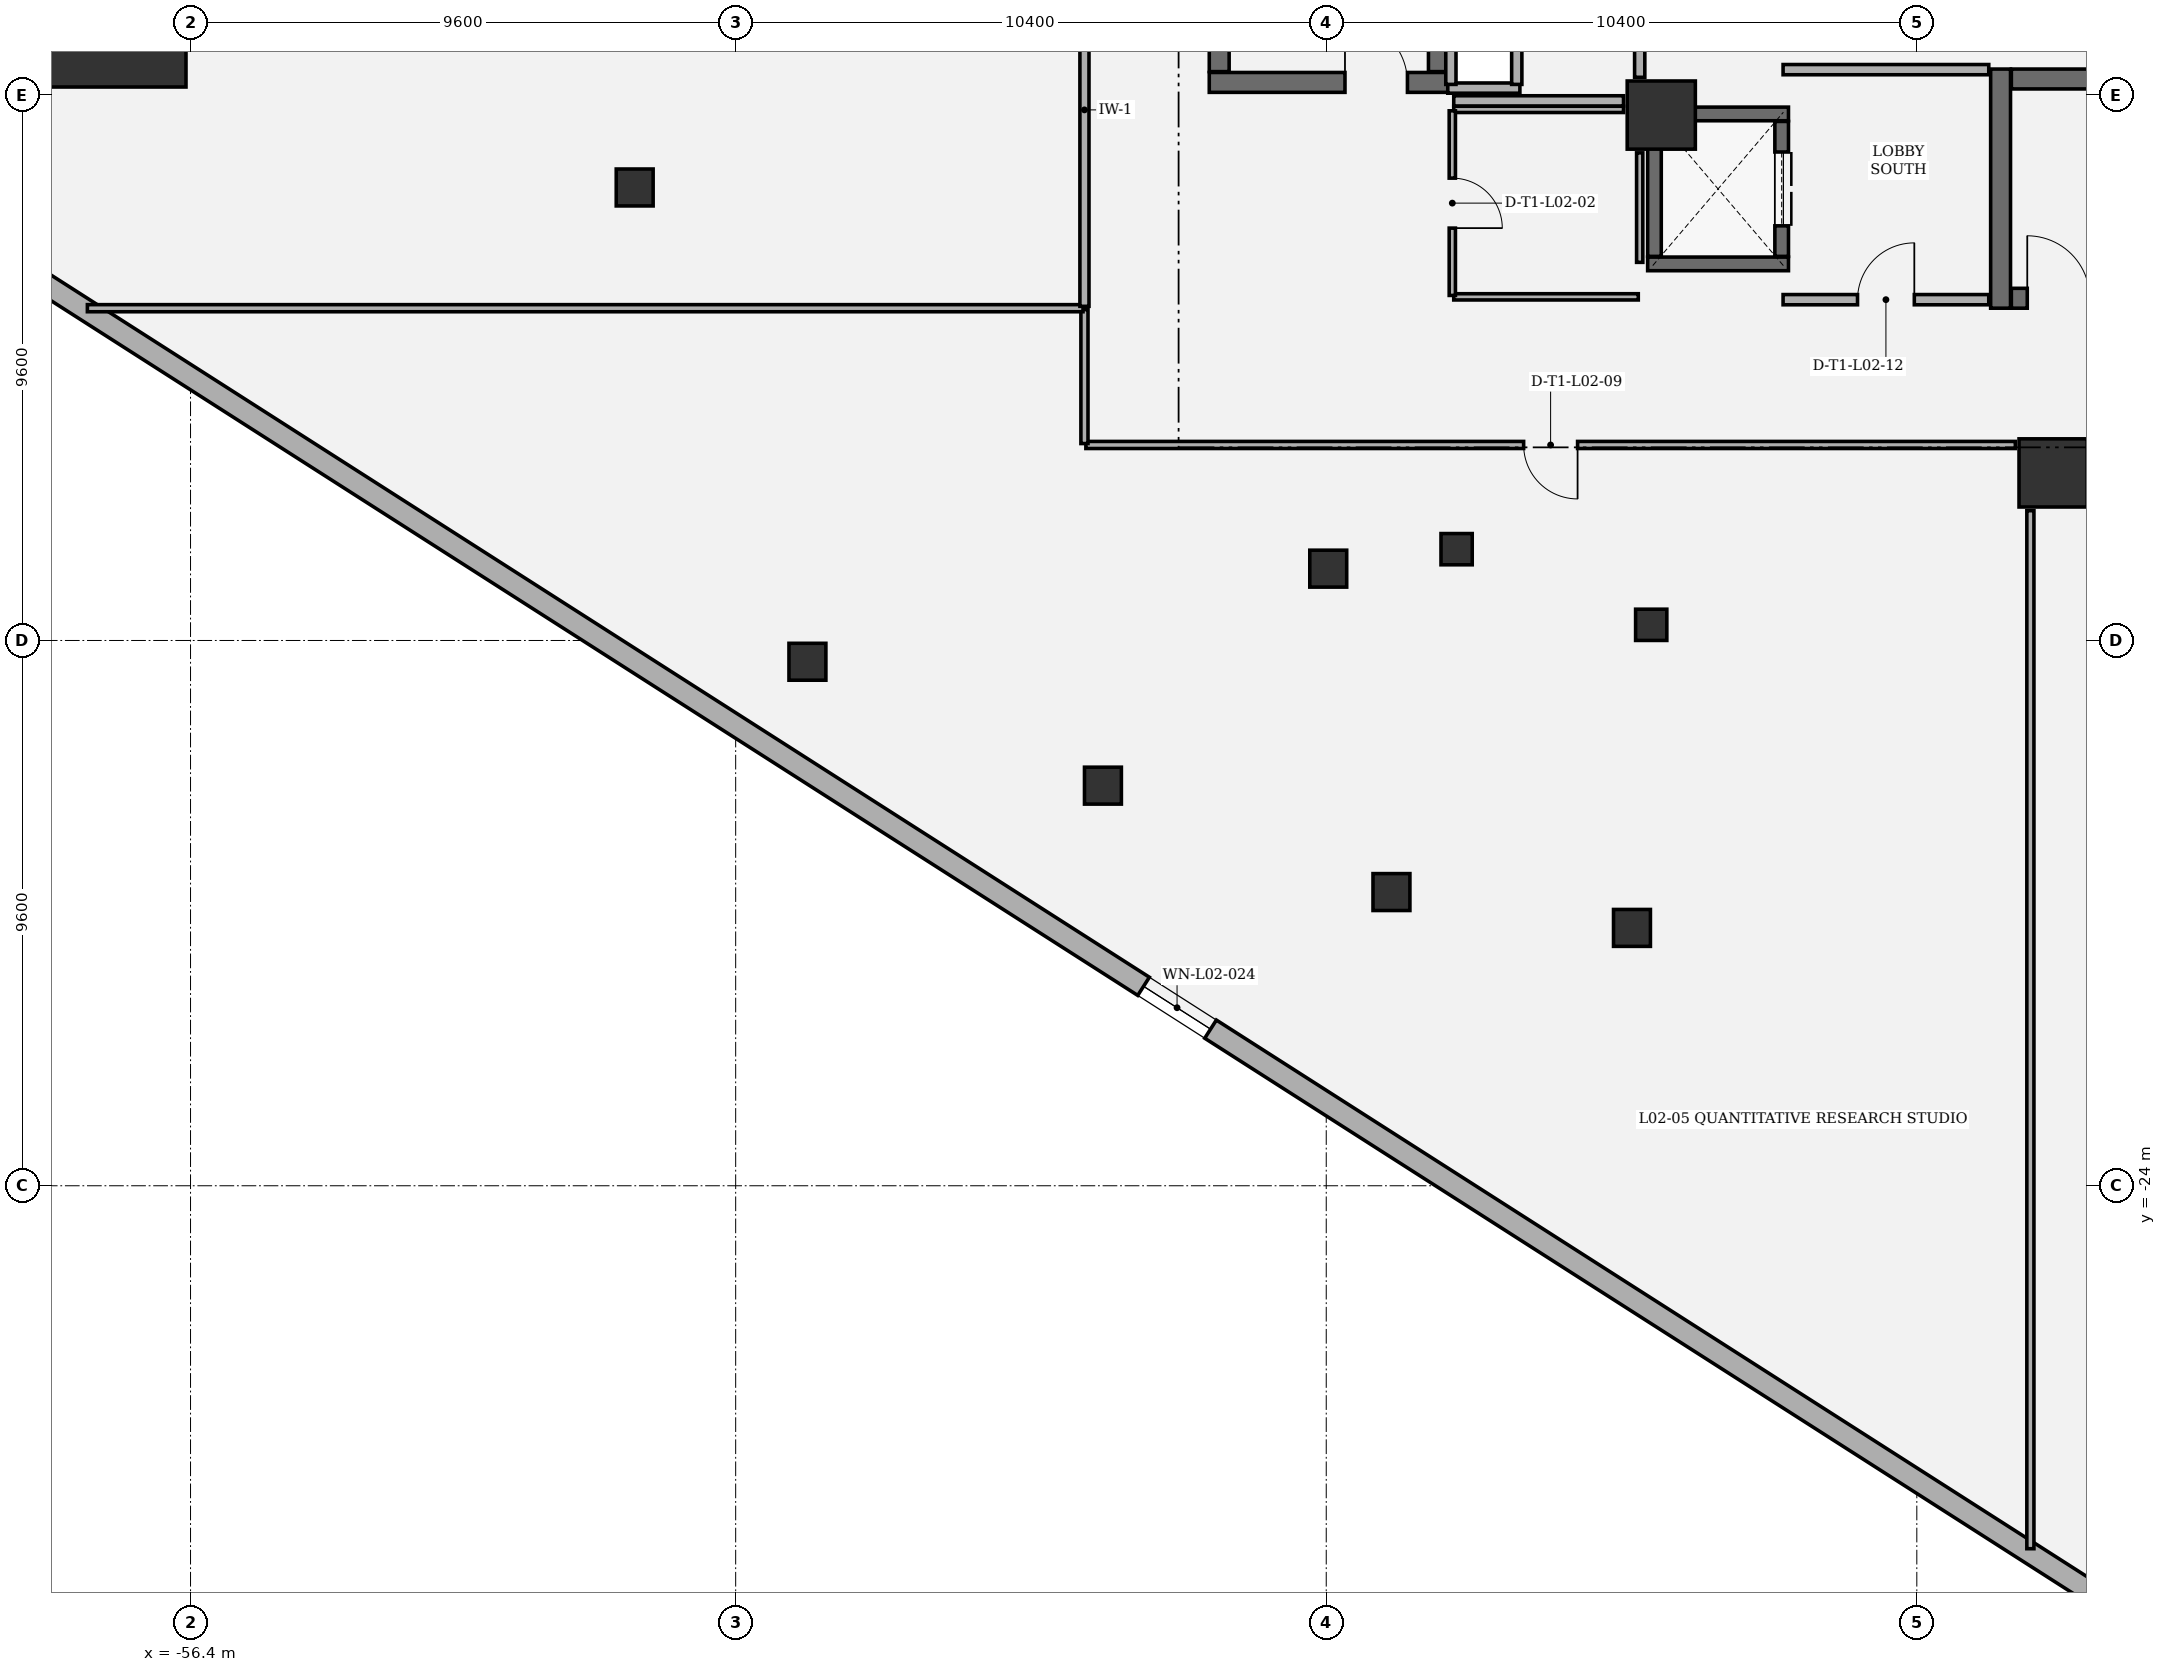
"""IFC4 building model, lengths in metres.
Left out: names, types, materials, properties, quantities, classifications, styles, units other than length and angle.
Written with IfcOpenShell. Run it as: python <this file> out.ifc"""

import sys

from ifc_helpers import new_model, si_unit, direction, frame, frame_2d, origin, origin_2d, place, context, subcontext, project, spatial, rectangle, extrude, element, fill, save


model = new_model("IFC4")
c1 = context("Model", 3, precision=1e-05, world=origin(), true_north=direction((0.0, 1.0)))
c2 = subcontext(c1, "Body", "Model", "MODEL_VIEW")
j1 = project(units=[si_unit("LENGTHUNIT", "METRE"), si_unit("PLANEANGLEUNIT", "RADIAN")], contexts=[c1])
p1 = place(None, origin())
s1 = spatial("IfcSite", under=j1, at=p1, CompositionType="ELEMENT")
p2 = place(p1, origin())
s2 = spatial("IfcBuilding", under=s1, at=p2, CompositionType="ELEMENT")
p3 = place(p2, frame((0.0, 0.0, 12.0)))
s3 = spatial("IfcBuildingStorey", under=s2, at=p3, CompositionType="ELEMENT", Elevation=12.0)
p4 = place(p3, frame((-57.68, -3.456, 0.0), z_axis=(0.0, 0.0, 1.0), x_axis=(1.0, 0.0, 0.0)))
e1 = element("IfcColumn", 1, at=p4, inside=s3, PredefinedType="COLUMN", context=c2, shape_type="SweptSolid", body=[
    extrude(rectangle(XDim=2.4, YDim=2.4, at=origin_2d()), origin(), (0.0, 0.0, 1.0), 5.0),
])
for number, where, z_axis, x_axis in (
    (2, (-23.6, -11.45, 0.0), (0.0, 0.0, 1.0), (1.0, 0.0, 0.0)),
    (3, (-30.5, -5.15, 0.0), (0.0, 0.0, 1.0), (1.0, 0.0, 0.0)),
):
    element("IfcColumn", number, at=place(p3, frame(where, z_axis=z_axis, x_axis=x_axis)), inside=s3, PredefinedType="COLUMN", context=c2, shape_type="SweptSolid", body=[
        extrude(rectangle(XDim=1.2, YDim=1.2, at=origin_2d()), origin(), (0.0, 0.0, 1.0), 5.0),
    ])
for number, where, z_axis, x_axis in (
    (4, (-45.536, -14.775, 0.0), (0.0, 0.0, 1.0), (1.0, 0.0, 0.0)),
    (5, (-40.333, -16.956, 0.0), (0.0, 0.0, 1.0), (1.0, 0.0, 0.0)),
    (6, (-35.252, -18.829, 0.0), (0.0, 0.0, 1.0), (1.0, 0.0, 0.0)),
    (7, (-31.016, -19.46, 0.0), (0.0, 0.0, 1.0), (1.0, 0.0, 0.0)),
    (8, (-48.578, -6.425, 0.0), (0.0, 0.0, 1.0), (1.0, 0.0, 0.0)),
    (9, (-36.365, -13.135, 0.0), (0.0, 0.0, 1.0), (1.0, 0.0, 0.0)),
):
    element("IfcColumn", number, at=place(p3, frame(where, z_axis=z_axis, x_axis=x_axis)), inside=s3, PredefinedType="COLUMN", context=c2, shape_type="SweptSolid", body=[
        extrude(rectangle(XDim=0.65, YDim=0.65, at=origin_2d()), origin(), (0.0, 0.0, 1.0), 5.0),
    ])
for number, where, z_axis, x_axis in (
    (10, (-34.104, -12.792, 0.0), (0.0, 0.0, 1.0), (1.0, 0.0, 0.0)),
    (11, (-30.677, -14.124, 0.0), (0.0, 0.0, 1.0), (1.0, 0.0, 0.0)),
):
    element("IfcColumn", number, at=place(p3, frame(where, z_axis=z_axis, x_axis=x_axis)), inside=s3, PredefinedType="COLUMN", context=c2, shape_type="SweptSolid", body=[
        extrude(rectangle(XDim=0.55, YDim=0.55, at=origin_2d()), origin(), (0.0, 0.0, 1.0), 5.0),
    ])
p5 = place(p3, frame((-13.635, -37.094, 0.0), z_axis=(0.0, 0.0, 1.0), x_axis=(-0.842602364841, 0.538536214905, 0.0)))
e12 = element("IfcWall", 12, at=p5, inside=s3, PredefinedType="SOLIDWALL", context=c2, shape_type="SweptSolid", body=[
    extrude(rectangle(XDim=60.27, YDim=0.38, at=frame_2d((30.135, 0.0))), origin(), (0.0, 0.0, 1.0), 4.74),
])
p6 = place(p5, frame((29.435, 0.0, 0.8)))
e13 = element("IfcOpeningElement", 13, at=p6, cuts=e12, PredefinedType="OPENING", context=c2, shape_type="SweptSolid", body=[
    extrude(rectangle(XDim=1.4, YDim=1.5, at=frame_2d((0.7, 0.75))), frame((0.0, 0.2, 0.0), z_axis=(0.0, -1.0, 0.0), x_axis=(1.0, 0.0, 0.0)), (0.0, 0.0, 1.0), 0.4),
])
p7 = place(p3, frame((-24.525, -4.34, 0.0), z_axis=(0.0, 0.0, 1.0), x_axis=(0.0, -1.0, 0.0)))
e14 = element("IfcWall", 14, at=p7, inside=s3, PredefinedType="SHEAR", context=c2, shape_type="SweptSolid", body=[
    extrude(rectangle(XDim=4.21, YDim=0.35, at=frame_2d((2.105, 0.0))), origin(), (0.0, 0.0, 1.0), 4.74),
])
p8 = place(p3, frame((-24.335, -8.375, 0.0), z_axis=(0.0, 0.0, 1.0), x_axis=(1.0, 0.0, 0.0)))
e15 = element("IfcWall", 15, at=p8, inside=s3, PredefinedType="SHEAR", context=c2, shape_type="SweptSolid", body=[
    extrude(rectangle(XDim=8.12, YDim=0.35, at=frame_2d((4.06, 0.0))), origin(), (0.0, 0.0, 1.0), 4.74),
])
p9 = place(p8, frame((0.28, 0.0, 0.0)))
e16 = element("IfcOpeningElement", 16, at=p9, cuts=e15, PredefinedType="OPENING", context=c2, shape_type="SweptSolid", body=[
    extrude(rectangle(XDim=1.1, YDim=2.2, at=frame_2d((0.55, 1.1))), frame((0.0, 0.185, 0.0), z_axis=(0.0, -1.0, 0.0), x_axis=(1.0, 0.0, 0.0)), (0.0, 0.0, 1.0), 0.37),
])
p10 = place(p3, frame((-16.215, -4.515, 0.0), z_axis=(0.0, 0.0, 1.0), x_axis=(-1.0, 0.0, 0.0)))
e17 = element("IfcWall", 17, at=p10, inside=s3, PredefinedType="SHEAR", context=c2, shape_type="SweptSolid", body=[
    extrude(rectangle(XDim=8.12, YDim=0.35, at=frame_2d((4.06, 0.0))), origin(), (0.0, 0.0, 1.0), 4.74),
])
p11 = place(p3, frame((-38.46, -4.575, 0.0), z_axis=(0.0, 0.0, 1.0), x_axis=(1.0, 0.0, 0.0)))
e18 = element("IfcWall", 18, at=p11, inside=s3, PredefinedType="SHEAR", context=c2, shape_type="SweptSolid", body=[
    extrude(rectangle(XDim=4.21, YDim=0.35, at=frame_2d((2.105, 0.0))), origin(), (0.0, 0.0, 1.0), 4.74),
])
p12 = place(p11, frame((2.39, 0.0, 0.0)))
e19 = element("IfcOpeningElement", 19, at=p12, cuts=e18, PredefinedType="OPENING", context=c2, shape_type="SweptSolid", body=[
    extrude(rectangle(XDim=1.1, YDim=2.2, at=frame_2d((0.55, 1.1))), frame((0.0, 0.185, 0.0), z_axis=(0.0, -1.0, 0.0), x_axis=(1.0, 0.0, 0.0)), (0.0, 0.0, 1.0), 0.37),
])
for number, where, z_axis, x_axis in (
    (20, (-34.425, -4.385, 0.0), (0.0, 0.0, 1.0), (0.0, 1.0, 0.0)),
    (21, (-38.285, 4.385, 0.0), (0.0, 0.0, 1.0), (0.0, -1.0, 0.0)),
):
    element("IfcWall", number, at=place(p3, frame(where, z_axis=z_axis, x_axis=x_axis)), inside=s3, PredefinedType="SHEAR", context=c2, shape_type="SweptSolid", body=[
        extrude(rectangle(XDim=8.77, YDim=0.35, at=frame_2d((4.385, 0.0))), origin(), (0.0, 0.0, 1.0), 4.74),
    ])
for number, where, z_axis, x_axis in (
    (22, (-28.26, -7.77, 0.0), (0.0, 0.0, 1.0), (-1.0, 0.0, 0.0)),
    (23, (-30.74, -5.13, 0.0), (0.0, 0.0, 1.0), (1.0, 0.0, 0.0)),
):
    element("IfcWall", number, at=place(p3, frame(where, z_axis=z_axis, x_axis=x_axis)), inside=s3, PredefinedType="SHEAR", context=c2, shape_type="SweptSolid", body=[
        extrude(rectangle(XDim=2.48, YDim=0.24, at=frame_2d((1.24, 0.0))), origin(), (0.0, 0.0, 1.0), 4.74),
    ])
p13 = place(p3, frame((-30.62, -7.638, 0.0), z_axis=(0.0, 0.0, 1.0), x_axis=(0.0, 1.0, 0.0)))
e24 = element("IfcWall", 24, at=p13, inside=s3, PredefinedType="SHEAR", context=c2, shape_type="SweptSolid", body=[
    extrude(rectangle(XDim=2.376, YDim=0.24, at=frame_2d((1.188, 0.0))), origin(), (0.0, 0.0, 1.0), 4.74),
])
p14 = place(p3, frame((-28.38, -5.262, 0.0), z_axis=(0.0, 0.0, 1.0), x_axis=(0.0, -1.0, 0.0)))
e25 = element("IfcWall", 25, at=p14, inside=s3, PredefinedType="SHEAR", context=c2, shape_type="SweptSolid", body=[
    extrude(rectangle(XDim=2.376, YDim=0.24, at=frame_2d((1.188, 0.0))), origin(), (0.0, 0.0, 1.0), 4.74),
])
p15 = place(p14, frame((0.538, 0.0, 0.0)))
e26 = element("IfcOpeningElement", 26, at=p15, cuts=e25, PredefinedType="OPENING", context=c2, shape_type="SweptSolid", body=[
    extrude(rectangle(XDim=1.3, YDim=2.3, at=frame_2d((0.65, 1.15))), frame((0.0, 0.13, 0.0), z_axis=(0.0, -1.0, 0.0), x_axis=(1.0, 0.0, 0.0)), (0.0, 0.0, 1.0), 0.26),
])
p16 = place(p3, frame((-32.99, -4.675, 0.0), z_axis=(0.0, 0.0, 1.0), x_axis=(-1.0, 0.0, 0.0)))
e27 = element("IfcWall", 27, at=p16, inside=s3, PredefinedType="PARTITIONING", context=c2, shape_type="SweptSolid", body=[
    extrude(rectangle(XDim=1.27, YDim=0.18, at=frame_2d((0.635, 0.0))), origin(), (0.0, 0.0, 1.0), 4.74),
])
for number, where, z_axis, x_axis in (
    (28, (-34.205, -4.61, 0.0), (0.0, 0.0, 1.0), (0.0, 1.0, 0.0)),
    (29, (-33.045, -3.66, 0.0), (0.0, 0.0, 1.0), (0.0, -1.0, 0.0)),
):
    element("IfcWall", number, at=place(p3, frame(where, z_axis=z_axis, x_axis=x_axis)), inside=s3, PredefinedType="PARTITIONING", context=c2, shape_type="SweptSolid", body=[
        extrude(rectangle(XDim=0.95, YDim=0.18, at=frame_2d((0.475, 0.0))), origin(), (0.0, 0.0, 1.0), 4.74),
    ])
p17 = place(p3, frame((-28.355, -8.4, 0.0), z_axis=(0.0, 0.0, 1.0), x_axis=(1.0, 0.0, 0.0)))
e30 = element("IfcWall", 30, at=p17, inside=s3, PredefinedType="PARTITIONING", context=c2, shape_type="SweptSolid", body=[
    extrude(rectangle(XDim=3.622, YDim=0.18, at=frame_2d((1.811, 0.0))), origin(), (0.0, 0.0, 1.0), 4.74),
])
p18 = place(p17, frame((1.311, 0.0, 0.0)))
e31 = element("IfcOpeningElement", 31, at=p18, cuts=e30, PredefinedType="OPENING", context=c2, shape_type="SweptSolid", body=[
    extrude(rectangle(XDim=1.0, YDim=2.15, at=frame_2d((0.5, 1.075))), frame((0.0, 0.1, 0.0), z_axis=(0.0, -1.0, 0.0), x_axis=(1.0, 0.0, 0.0)), (0.0, 0.0, 1.0), 0.2),
])
p19 = place(p3, frame((-24.733, -4.35, 0.0), z_axis=(0.0, 0.0, 1.0), x_axis=(-1.0, 0.0, 0.0)))
e32 = element("IfcWall", 32, at=p19, inside=s3, PredefinedType="PARTITIONING", context=c2, shape_type="SweptSolid", body=[
    extrude(rectangle(XDim=3.622, YDim=0.18, at=frame_2d((1.811, 0.0))), origin(), (0.0, 0.0, 1.0), 4.74),
])
p20 = place(p3, frame((-34.155, -8.35, 0.0), z_axis=(0.0, 0.0, 1.0), x_axis=(1.0, 0.0, 0.0)))
e33 = element("IfcWall", 33, at=p20, inside=s3, PredefinedType="PARTITIONING", context=c2, shape_type="SweptSolid", body=[
    extrude(rectangle(XDim=3.25, YDim=0.11, at=frame_2d((1.625, 0.0))), origin(), (0.0, 0.0, 1.0), 4.74),
])
p21 = place(p3, frame((-30.88, -7.743, 0.0), z_axis=(0.0, 0.0, 1.0), x_axis=(0.0, 1.0, 0.0)))
e34 = element("IfcWall", 34, at=p21, inside=s3, PredefinedType="PARTITIONING", context=c2, shape_type="SweptSolid", body=[
    extrude(rectangle(XDim=1.928, YDim=0.11, at=frame_2d((0.964, 0.0))), origin(), (0.0, 0.0, 1.0), 4.74),
])
p22 = place(p3, frame((-31.165, -5.05, 0.0), z_axis=(0.0, 0.0, 1.0), x_axis=(-1.0, 0.0, 0.0)))
e35 = element("IfcWall", 35, at=p22, inside=s3, PredefinedType="PARTITIONING", context=c2, shape_type="SweptSolid", body=[
    extrude(rectangle(XDim=2.99, YDim=0.11, at=frame_2d((1.495, 0.0))), origin(), (0.0, 0.0, 1.0), 4.74),
])
p23 = place(p3, frame((-34.18, -5.075, 0.0), z_axis=(0.0, 0.0, 1.0), x_axis=(0.0, -1.0, 0.0)))
e36 = element("IfcWall", 36, at=p23, inside=s3, PredefinedType="PARTITIONING", context=c2, shape_type="SweptSolid", body=[
    extrude(rectangle(XDim=3.25, YDim=0.11, at=frame_2d((1.625, 0.0))), origin(), (0.0, 0.0, 1.0), 4.74),
])
p24 = place(p23, frame((1.185, 0.0, 0.0)))
e37 = element("IfcOpeningElement", 37, at=p24, cuts=e36, PredefinedType="OPENING", context=c2, shape_type="SweptSolid", body=[
    extrude(rectangle(XDim=0.88, YDim=2.1, at=frame_2d((0.44, 1.05))), frame((0.0, 0.065, 0.0), z_axis=(0.0, -1.0, 0.0), x_axis=(1.0, 0.0, 0.0)), (0.0, 0.0, 1.0), 0.13),
])
p25 = place(p3, frame((-34.155, -4.9, 0.0), z_axis=(0.0, 0.0, 1.0), x_axis=(1.0, 0.0, 0.0)))
e38 = element("IfcWall", 38, at=p25, inside=s3, PredefinedType="PARTITIONING", context=c2, shape_type="SweptSolid", body=[
    extrude(rectangle(XDim=2.99, YDim=0.18, at=frame_2d((1.495, 0.0))), origin(), (0.0, 0.0, 1.0), 4.74),
])
p26 = place(p3, frame((-30.88, -4.485, 0.0), z_axis=(0.0, 0.0, 1.0), x_axis=(0.0, 1.0, 0.0)))
e39 = element("IfcWall", 39, at=p26, inside=s3, PredefinedType="PARTITIONING", context=c2, shape_type="SweptSolid", body=[
    extrude(rectangle(XDim=2.86, YDim=0.18, at=frame_2d((1.43, 0.0))), origin(), (0.0, 0.0, 1.0), 4.74),
])
p27 = place(p3, frame((-24.0, -12.115, 0.0), z_axis=(0.0, 0.0, 1.0), x_axis=(0.0, -1.0, 0.0)))
e40 = element("IfcWall", 40, at=p27, inside=s3, PredefinedType="PARTITIONING", context=c2, shape_type="SweptSolid", body=[
    extrude(rectangle(XDim=18.275, YDim=0.125, at=frame_2d((9.137, 0.0))), origin(), (0.0, 0.0, 1.0), 4.253),
])
p28 = place(p3, frame((-24.265, -10.958, 0.0), z_axis=(0.0, 0.0, 1.0), x_axis=(-1.0, 0.0, 0.0)))
e41 = element("IfcWall", 41, at=p28, inside=s3, PredefinedType="PARTITIONING", context=c2, shape_type="SweptSolid", body=[
    extrude(rectangle(XDim=16.368, YDim=0.125, at=frame_2d((8.184, 0.0))), origin(), (0.0, 0.0, 1.0), 4.253),
])
p29 = place(p28, frame((7.709, 0.0, 0.0)))
e42 = element("IfcOpeningElement", 42, at=p29, cuts=e41, PredefinedType="OPENING", context=c2, shape_type="SweptSolid", body=[
    extrude(rectangle(XDim=0.95, YDim=2.15, at=frame_2d((0.475, 1.075))), frame((0.0, 0.073, 0.0), z_axis=(0.0, -1.0, 0.0), x_axis=(1.0, 0.0, 0.0)), (0.0, 0.0, 1.0), 0.145),
])
p30 = place(p3, frame((-40.658, -8.575, 0.0), z_axis=(0.0, 0.0, 1.0), x_axis=(0.0, -1.0, 0.0)))
e43 = element("IfcWall", 43, at=p30, inside=s3, PredefinedType="PARTITIONING", context=c2, shape_type="SweptSolid", body=[
    extrude(rectangle(XDim=2.358, YDim=0.125, at=frame_2d((1.179, 0.0))), origin(), (0.0, 0.0, 1.0), 4.74),
])
p31 = place(p3, frame((-40.683, -8.55, 0.0), z_axis=(0.0, 0.0, 1.0), x_axis=(-1.0, 0.0, 0.0)))
e44 = element("IfcWall", 44, at=p31, inside=s3, PredefinedType="PARTITIONING", context=c2, shape_type="SweptSolid", body=[
    extrude(rectangle(XDim=17.533, YDim=0.125, at=frame_2d((8.767, 0.0))), origin(), (0.0, 0.0, 1.0), 3.71),
])
p32 = place(p3, frame((-40.658, -8.517, 0.0), z_axis=(0.0, 0.0, 1.0), x_axis=(0.0, 1.0, 0.0)))
e45 = element("IfcWall", 45, at=p32, inside=s3, PredefinedType="PARTITIONING", context=c2, shape_type="SweptSolid", body=[
    extrude(rectangle(XDim=16.804, YDim=0.16, at=frame_2d((8.402, 0.0))), origin(), (0.0, 0.0, 1.0), 4.74),
])
p33 = place(p32, frame((7.852, 0.0, 0.0)))
e46 = element("IfcOpeningElement", 46, at=p33, cuts=e45, PredefinedType="OPENING", context=c2, shape_type="SweptSolid", body=[
    extrude(rectangle(XDim=1.1, YDim=2.15, at=frame_2d((0.55, 1.075))), frame((0.0, 0.09, 0.0), z_axis=(0.0, -1.0, 0.0), x_axis=(1.0, 0.0, 0.0)), (0.0, 0.0, 1.0), 0.18),
])
p34 = place(p6, origin())
e47 = element("IfcWindow", 47, at=p34, inside=s3, PartitioningType="SINGLE_PANEL", PredefinedType="WINDOW", context=c2, shape_type="SweptSolid", body=[
    extrude(rectangle(XDim=1.4, YDim=1.5, at=frame_2d((0.7, 0.75))), frame((0.0, 0.03, 0.0), z_axis=(0.0, -1.0, 0.0), x_axis=(1.0, 0.0, 0.0)), (0.0, 0.0, 1.0), 0.06),
])
fill(e13, e47)
p35 = place(p9, origin())
e48 = element("IfcDoor", 48, at=p35, inside=s3, OperationType="SINGLE_SWING_LEFT", PredefinedType="DOOR", context=c2, shape_type="SweptSolid", body=[
    extrude(rectangle(XDim=1.1, YDim=2.2, at=frame_2d((0.55, 1.1))), frame((0.0, 0.025, 0.0), z_axis=(0.0, -1.0, 0.0), x_axis=(1.0, 0.0, 0.0)), (0.0, 0.0, 1.0), 0.05),
])
fill(e16, e48)
p36 = place(p12, origin())
e49 = element("IfcDoor", 49, at=p36, inside=s3, OperationType="SINGLE_SWING_LEFT", PredefinedType="DOOR", context=c2, shape_type="SweptSolid", body=[
    extrude(rectangle(XDim=1.1, YDim=2.2, at=frame_2d((0.55, 1.1))), frame((0.0, 0.025, 0.0), z_axis=(0.0, -1.0, 0.0), x_axis=(1.0, 0.0, 0.0)), (0.0, 0.0, 1.0), 0.05),
])
fill(e19, e49)
p37 = place(p15, origin())
e50 = element("IfcDoor", 50, at=p37, inside=s3, OperationType="DOUBLE_DOOR_SLIDING", PredefinedType="DOOR", context=c2, shape_type="SweptSolid", body=[
    extrude(rectangle(XDim=1.3, YDim=2.3, at=frame_2d((0.65, 1.15))), frame((0.0, 0.025, 0.0), z_axis=(0.0, -1.0, 0.0), x_axis=(1.0, 0.0, 0.0)), (0.0, 0.0, 1.0), 0.05),
])
fill(e26, e50)
p38 = place(p24, origin())
e51 = element("IfcDoor", 51, at=p38, inside=s3, OperationType="SINGLE_SWING_RIGHT", PredefinedType="DOOR", context=c2, shape_type="SweptSolid", body=[
    extrude(rectangle(XDim=0.88, YDim=2.1, at=frame_2d((0.44, 1.05))), frame((0.0, 0.025, 0.0), z_axis=(0.0, -1.0, 0.0), x_axis=(1.0, 0.0, 0.0)), (0.0, 0.0, 1.0), 0.05),
])
fill(e37, e51)
p39 = place(p29, origin())
e52 = element("IfcDoor", 52, at=p39, inside=s3, OperationType="SINGLE_SWING_LEFT", PredefinedType="DOOR", context=c2, shape_type="SweptSolid", body=[
    extrude(rectangle(XDim=0.95, YDim=2.15, at=frame_2d((0.475, 1.075))), frame((0.0, 0.025, 0.0), z_axis=(0.0, -1.0, 0.0), x_axis=(1.0, 0.0, 0.0)), (0.0, 0.0, 1.0), 0.05),
])
fill(e42, e52)
p40 = place(p18, origin())
e53 = element("IfcDoor", 53, at=p40, inside=s3, OperationType="SINGLE_SWING_RIGHT", PredefinedType="DOOR", context=c2, shape_type="SweptSolid", body=[
    extrude(rectangle(XDim=1.0, YDim=2.15, at=frame_2d((0.5, 1.075))), frame((0.0, 0.025, 0.0), z_axis=(0.0, -1.0, 0.0), x_axis=(1.0, 0.0, 0.0)), (0.0, 0.0, 1.0), 0.05),
])
fill(e31, e53)
save(model, sys.argv[1])
